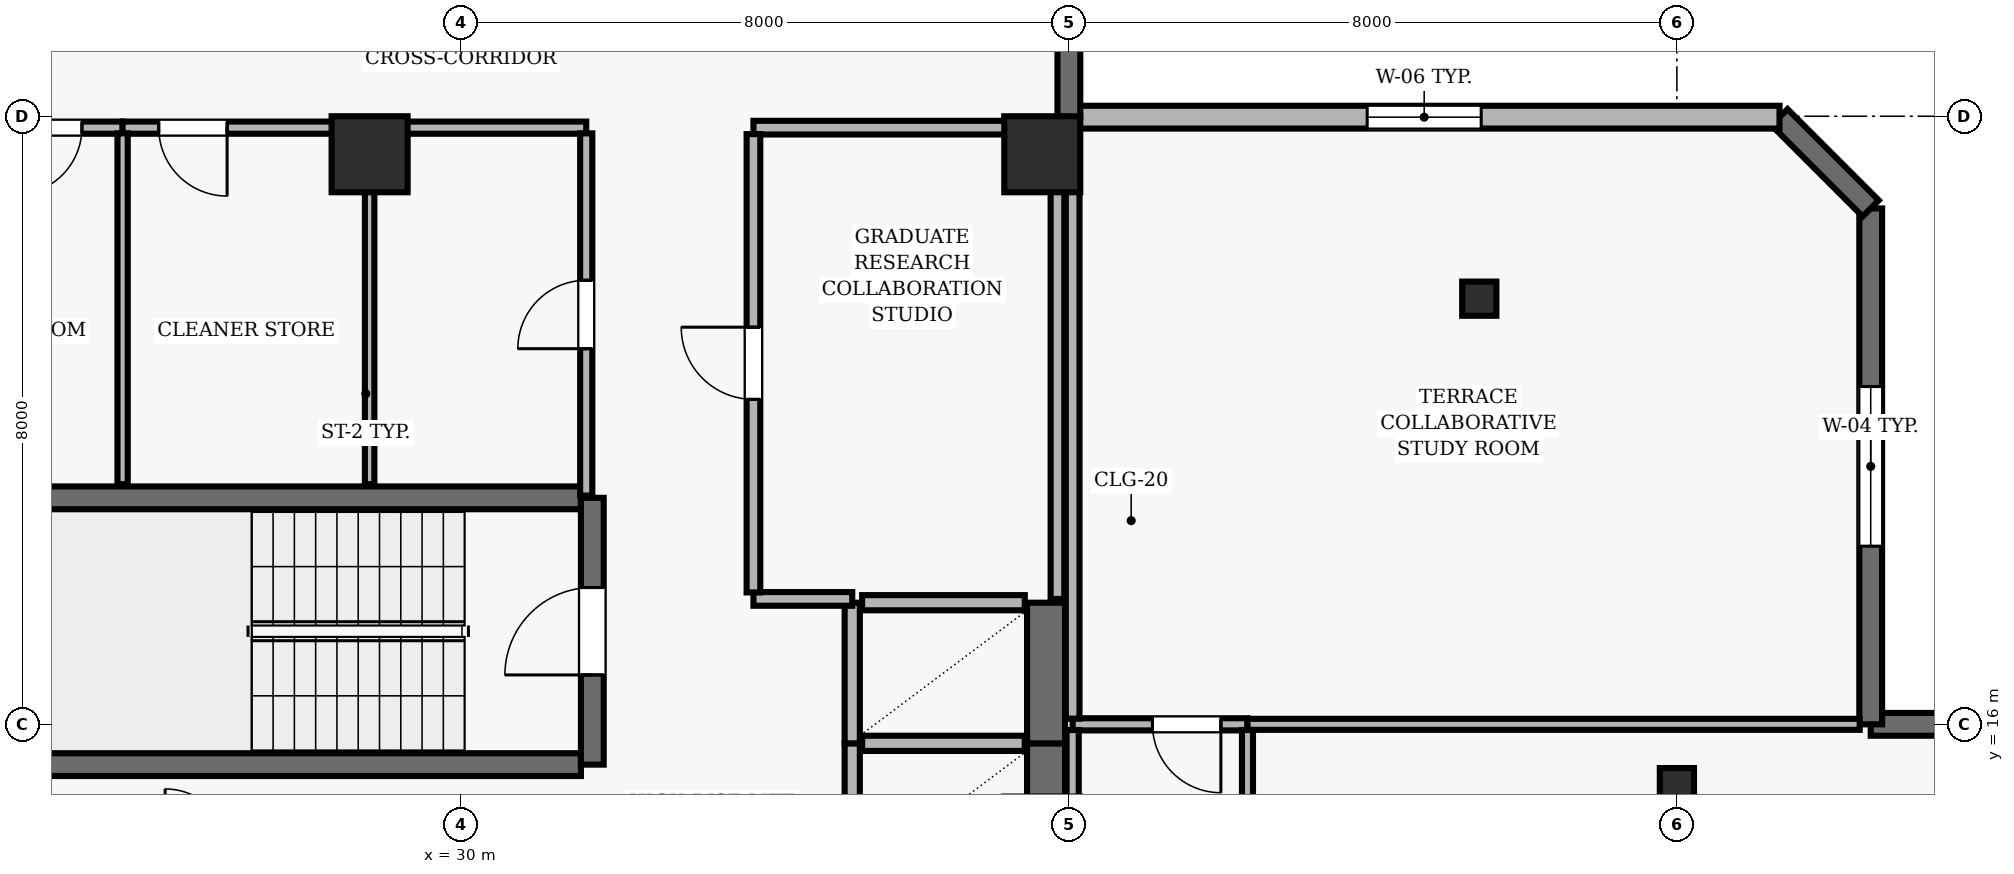
"""IFC4 building model, lengths in metres.
Left out: names, types, materials, properties, quantities, classifications, styles, units other than length and angle.
Written with IfcOpenShell. Run it as: python <this file> out.ifc"""

import sys

from ifc_helpers import new_model, si_unit, direction, frame, frame_2d, origin, origin_2d, place, context, subcontext, project, spatial, rectangle, hollow_rectangle, extrude, element, fill, save


model = new_model("IFC4")
c1 = context("Model", 3, precision=1e-05, world=origin(), true_north=direction((0.0, 1.0)))
c2 = subcontext(c1, "Body", "Model", "MODEL_VIEW")
j1 = project(units=[si_unit("LENGTHUNIT", "METRE"), si_unit("PLANEANGLEUNIT", "RADIAN")], contexts=[c1])
p1 = place(None, origin())
s1 = spatial("IfcSite", under=j1, at=p1, CompositionType="ELEMENT")
p2 = place(p1, origin())
s2 = spatial("IfcBuilding", under=s1, at=p2, CompositionType="ELEMENT")
p3 = place(p2, frame((0.0, 0.0, 191.4)))
s3 = spatial("IfcBuildingStorey", under=s2, at=p3, CompositionType="ELEMENT", Elevation=191.4)
for number, where, z_axis, x_axis in (
    (1, (28.8, 23.5, 0.0), (0.0, 0.0, 1.0), (1.0, 0.0, 0.0)),
    (2, (37.65, 23.5, 0.0), (0.0, 0.0, 1.0), (1.0, 0.0, 0.0)),
):
    element("IfcColumn", number, at=place(p3, frame(where, z_axis=z_axis, x_axis=x_axis)), inside=s3, PredefinedType="COLUMN", context=c2, shape_type="SweptSolid", body=[
        extrude(rectangle(XDim=1.0, YDim=1.0, at=origin_2d()), origin(), (0.0, 0.0, 1.0), 3.9),
    ])
for number, where, z_axis, x_axis in (
    (3, (46.0, 15.2, 0.0), (0.0, 0.0, 1.0), (1.0, 0.0, 0.0)),
    (4, (43.4, 21.6, 0.0), (0.0, 0.0, 1.0), (1.0, 0.0, 0.0)),
):
    element("IfcColumn", number, at=place(p3, frame(where, z_axis=z_axis, x_axis=x_axis)), inside=s3, PredefinedType="COLUMN", context=c2, shape_type="SweptSolid", body=[
        extrude(hollow_rectangle(XDim=0.45, YDim=0.45, WallThickness=0.02, at=origin_2d()), origin(), (0.0, 0.0, 1.0), 3.9),
    ])
p4 = place(p3, frame((62.7, 16.0, 0.0), z_axis=(0.0, 0.0, 1.0), x_axis=(-1.0, 0.0, 0.0)))
e5 = element("IfcWall", 5, at=p4, inside=s3, PredefinedType="SOLIDWALL", context=c2, shape_type="SweptSolid", body=[
    extrude(rectangle(XDim=14.15, YDim=0.3, at=frame_2d((7.075, 0.0))), origin(), (0.0, 0.0, 1.0), 3.69),
])
p5 = place(p4, frame((6.475, 0.0, 0.0)))
e6 = element("IfcOpeningElement", 6, at=p5, cuts=e5, PredefinedType="OPENING", context=c2, shape_type="SweptSolid", body=[
    extrude(rectangle(XDim=1.0, YDim=2.2, at=frame_2d((0.5, 1.1))), frame((0.0, 0.16, 0.0), z_axis=(0.0, -1.0, 0.0), x_axis=(1.0, 0.0, 0.0)), (0.0, 0.0, 1.0), 0.32),
])
p6 = place(p4, frame((2.638, 0.0, 0.9)))
e7 = element("IfcOpeningElement", 7, at=p6, cuts=e5, PredefinedType="OPENING", context=c2, shape_type="SweptSolid", body=[
    extrude(rectangle(XDim=1.8, YDim=1.6, at=frame_2d((0.9, 0.8))), frame((0.0, 0.16, 0.0), z_axis=(0.0, -1.0, 0.0), x_axis=(1.0, 0.0, 0.0)), (0.0, 0.0, 1.0), 0.32),
])
p7 = place(p3, frame((48.55, 16.0, 0.0), z_axis=(0.0, 0.0, 1.0), x_axis=(0.0, 1.0, 0.0)))
e8 = element("IfcWall", 8, at=p7, inside=s3, PredefinedType="SOLIDWALL", context=c2, shape_type="SweptSolid", body=[
    extrude(rectangle(XDim=6.788, YDim=0.3, at=frame_2d((3.394, 0.0))), origin(), (0.0, 0.0, 1.0), 3.69),
])
p8 = place(p7, frame((2.344, 0.0, 0.9)))
e9 = element("IfcOpeningElement", 9, at=p8, cuts=e8, PredefinedType="OPENING", context=c2, shape_type="SweptSolid", body=[
    extrude(rectangle(XDim=2.1, YDim=1.6, at=frame_2d((1.05, 0.8))), frame((0.0, 0.16, 0.0), z_axis=(0.0, -1.0, 0.0), x_axis=(1.0, 0.0, 0.0)), (0.0, 0.0, 1.0), 0.32),
])
p9 = place(p3, frame((48.55, 22.788, 0.0), z_axis=(0.0, 0.0, 1.0), x_axis=(-0.707106781187, 0.707106781187, 0.0)))
e10 = element("IfcWall", 10, at=p9, inside=s3, PredefinedType="SOLIDWALL", context=c2, shape_type="SweptSolid", body=[
    extrude(rectangle(XDim=1.697, YDim=0.3, at=frame_2d((0.849, 0.0))), origin(), (0.0, 0.0, 1.0), 3.69),
])
p10 = place(p3, frame((47.35, 23.988, 0.0), z_axis=(0.0, 0.0, 1.0), x_axis=(-1.0, 0.0, 0.0)))
e11 = element("IfcWall", 11, at=p10, inside=s3, PredefinedType="SOLIDWALL", context=c2, shape_type="SweptSolid", body=[
    extrude(rectangle(XDim=9.35, YDim=0.3, at=frame_2d((4.675, 0.0))), origin(), (0.0, 0.0, 1.0), 3.69),
])
p11 = place(p10, frame((3.925, 0.0, 0.9)))
e12 = element("IfcOpeningElement", 12, at=p11, cuts=e11, PredefinedType="OPENING", context=c2, shape_type="SweptSolid", body=[
    extrude(rectangle(XDim=1.5, YDim=1.8, at=frame_2d((0.75, 0.9))), frame((0.0, 0.16, 0.0), z_axis=(0.0, -1.0, 0.0), x_axis=(1.0, 0.0, 0.0)), (0.0, 0.0, 1.0), 0.32),
])
p12 = place(p3, frame((38.0, 23.988, 0.0), z_axis=(0.0, 0.0, 1.0), x_axis=(0.0, 1.0, 0.0)))
e13 = element("IfcWall", 13, at=p12, inside=s3, PredefinedType="SOLIDWALL", context=c2, shape_type="SweptSolid", body=[
    extrude(rectangle(XDim=16.712, YDim=0.3, at=frame_2d((8.356, 0.0))), origin(), (0.0, 0.0, 1.0), 3.69),
])
p13 = place(p12, frame((7.956, 0.0, 0.0)))
e14 = element("IfcOpeningElement", 14, at=p13, cuts=e13, PredefinedType="OPENING", context=c2, shape_type="SweptSolid", body=[
    extrude(rectangle(XDim=1.0, YDim=2.2, at=frame_2d((0.5, 1.1))), frame((0.0, 0.16, 0.0), z_axis=(0.0, -1.0, 0.0), x_axis=(1.0, 0.0, 0.0)), (0.0, 0.0, 1.0), 0.32),
])
p14 = place(p12, frame((2.785, 0.0, 0.9)))
e15 = element("IfcOpeningElement", 15, at=p14, cuts=e13, PredefinedType="OPENING", context=c2, shape_type="SweptSolid", body=[
    extrude(rectangle(XDim=1.8, YDim=1.8, at=frame_2d((0.9, 0.9))), frame((0.0, 0.16, 0.0), z_axis=(0.0, -1.0, 0.0), x_axis=(1.0, 0.0, 0.0)), (0.0, 0.0, 1.0), 0.32),
])
for number, where, z_axis, x_axis in (
    (16, (31.58, 18.98, 0.0), (0.0, 0.0, 1.0), (-1.0, 0.0, 0.0)),
    (17, (23.22, 15.47, 0.0), (0.0, 0.0, 1.0), (1.0, 0.0, 0.0)),
):
    element("IfcWall", number, at=place(p3, frame(where, z_axis=z_axis, x_axis=x_axis)), inside=s3, PredefinedType="SHEAR", context=c2, shape_type="SweptSolid", body=[
        extrude(rectangle(XDim=8.36, YDim=0.3, at=frame_2d((4.18, 0.0))), origin(), (0.0, 0.0, 1.0), 3.69),
    ])
p15 = place(p3, frame((31.73, 15.47, 0.0), z_axis=(0.0, 0.0, 1.0), x_axis=(0.0, 1.0, 0.0)))
e18 = element("IfcWall", 18, at=p15, inside=s3, PredefinedType="SHEAR", context=c2, shape_type="SweptSolid", body=[
    extrude(rectangle(XDim=3.51, YDim=0.3, at=frame_2d((1.755, 0.0))), origin(), (0.0, 0.0, 1.0), 3.69),
])
p16 = place(p15, frame((1.18, 0.0, 0.0)))
e19 = element("IfcOpeningElement", 19, at=p16, cuts=e18, PredefinedType="OPENING", context=c2, shape_type="SweptSolid", body=[
    extrude(rectangle(XDim=1.15, YDim=2.15, at=frame_2d((0.575, 1.075))), frame((0.0, 0.16, 0.0), z_axis=(0.0, -1.0, 0.0), x_axis=(1.0, 0.0, 0.0)), (0.0, 0.0, 1.0), 0.32),
])
p17 = place(p3, frame((35.15, 15.75, 0.0), z_axis=(0.0, 0.0, 1.0), x_axis=(0.0, -1.0, 0.0)))
e20 = element("IfcWall", 20, at=p17, inside=s3, PredefinedType="SOLIDWALL", context=c2, shape_type="SweptSolid", body=[
    extrude(rectangle(XDim=1.85, YDim=0.2, at=frame_2d((0.925, 0.0))), origin(), (0.0, 0.0, 1.0), 3.69),
])
p18 = place(p3, frame((37.7, 13.9, 0.0), z_axis=(0.0, 0.0, 1.0), x_axis=(0.0, 1.0, 0.0)))
e21 = element("IfcWall", 21, at=p18, inside=s3, PredefinedType="SHEAR", context=c2, shape_type="SweptSolid", body=[
    extrude(rectangle(XDim=1.85, YDim=0.5, at=frame_2d((0.925, 0.0))), origin(), (0.0, 0.0, 1.0), 3.69),
])
p19 = place(p3, frame((37.42, 15.75, 0.0), z_axis=(0.0, 0.0, 1.0), x_axis=(-1.0, 0.0, 0.0)))
e22 = element("IfcWall", 22, at=p19, inside=s3, PredefinedType="SOLIDWALL", context=c2, shape_type="SweptSolid", body=[
    extrude(rectangle(XDim=2.14, YDim=0.2, at=frame_2d((1.07, 0.0))), origin(), (0.0, 0.0, 1.0), 3.69),
])
p20 = place(p3, frame((35.15, 17.6, 0.0), z_axis=(0.0, 0.0, 1.0), x_axis=(0.0, -1.0, 0.0)))
e23 = element("IfcWall", 23, at=p20, inside=s3, PredefinedType="SOLIDWALL", context=c2, shape_type="SweptSolid", body=[
    extrude(rectangle(XDim=1.85, YDim=0.2, at=frame_2d((0.925, 0.0))), origin(), (0.0, 0.0, 1.0), 3.69),
])
p21 = place(p3, frame((37.7, 15.75, 0.0), z_axis=(0.0, 0.0, 1.0), x_axis=(0.0, 1.0, 0.0)))
e24 = element("IfcWall", 24, at=p21, inside=s3, PredefinedType="SHEAR", context=c2, shape_type="SweptSolid", body=[
    extrude(rectangle(XDim=1.85, YDim=0.5, at=frame_2d((0.925, 0.0))), origin(), (0.0, 0.0, 1.0), 3.69),
])
p22 = place(p3, frame((37.42, 17.6, 0.0), z_axis=(0.0, 0.0, 1.0), x_axis=(-1.0, 0.0, 0.0)))
e25 = element("IfcWall", 25, at=p22, inside=s3, PredefinedType="SOLIDWALL", context=c2, shape_type="SweptSolid", body=[
    extrude(rectangle(XDim=2.14, YDim=0.2, at=frame_2d((1.07, 0.0))), origin(), (0.0, 0.0, 1.0), 3.69),
])
p23 = place(p3, frame((25.55, 23.85, 0.0), z_axis=(0.0, 0.0, 1.0), x_axis=(-1.0, 0.0, 0.0)))
e26 = element("IfcWall", 26, at=p23, inside=s3, PredefinedType="PARTITIONING", context=c2, shape_type="SweptSolid", body=[
    extrude(rectangle(XDim=3.35, YDim=0.16, at=frame_2d((1.675, 0.0))), origin(), (0.0, 0.0, 1.0), 3.139),
])
p24 = place(p23, frame((0.535, 0.0, 0.0)))
e27 = element("IfcOpeningElement", 27, at=p24, cuts=e26, PredefinedType="OPENING", context=c2, shape_type="SweptSolid", body=[
    extrude(rectangle(XDim=0.88, YDim=2.1, at=frame_2d((0.44, 1.05))), frame((0.0, 0.09, 0.0), z_axis=(0.0, -1.0, 0.0), x_axis=(1.0, 0.0, 0.0)), (0.0, 0.0, 1.0), 0.18),
])
p25 = place(p3, frame((28.8, 23.85, 0.0), z_axis=(0.0, 0.0, 1.0), x_axis=(-1.0, 0.0, 0.0)))
e28 = element("IfcWall", 28, at=p25, inside=s3, PredefinedType="PARTITIONING", context=c2, shape_type="SweptSolid", body=[
    extrude(rectangle(XDim=3.25, YDim=0.16, at=frame_2d((1.625, 0.0))), origin(), (0.0, 0.0, 1.0), 3.139),
])
p26 = place(p25, frame((1.875, 0.0, 0.0)))
e29 = element("IfcOpeningElement", 29, at=p26, cuts=e28, PredefinedType="OPENING", context=c2, shape_type="SweptSolid", body=[
    extrude(rectangle(XDim=0.9, YDim=2.1, at=frame_2d((0.45, 1.05))), frame((0.0, 0.09, 0.0), z_axis=(0.0, -1.0, 0.0), x_axis=(1.0, 0.0, 0.0)), (0.0, 0.0, 1.0), 0.18),
])
p27 = place(p3, frame((31.65, 23.85, 0.0), z_axis=(0.0, 0.0, 1.0), x_axis=(-1.0, 0.0, 0.0)))
e30 = element("IfcWall", 30, at=p27, inside=s3, PredefinedType="PARTITIONING", context=c2, shape_type="SweptSolid", body=[
    extrude(rectangle(XDim=2.85, YDim=0.16, at=frame_2d((1.425, 0.0))), origin(), (0.0, 0.0, 1.0), 3.139),
])
p28 = place(p3, frame((33.85, 17.65, 0.0), z_axis=(0.0, 0.0, 1.0), x_axis=(1.0, 0.0, 0.0)))
e31 = element("IfcWall", 31, at=p28, inside=s3, PredefinedType="PARTITIONING", context=c2, shape_type="SweptSolid", body=[
    extrude(rectangle(XDim=1.3, YDim=0.18, at=frame_2d((0.65, 0.0))), origin(), (0.0, 0.0, 1.0), 3.69),
])
p29 = place(p3, frame((37.85, 23.85, 0.0), z_axis=(0.0, 0.0, 1.0), x_axis=(-1.0, 0.0, 0.0)))
e32 = element("IfcWall", 32, at=p29, inside=s3, PredefinedType="PARTITIONING", context=c2, shape_type="SweptSolid", body=[
    extrude(rectangle(XDim=4.0, YDim=0.18, at=frame_2d((2.0, 0.0))), origin(), (0.0, 0.0, 1.0), 3.139),
])
p30 = place(p3, frame((40.35, 16.0, 0.0), z_axis=(0.0, 0.0, 1.0), x_axis=(-1.0, 0.0, 0.0)))
e33 = element("IfcWall", 33, at=p30, inside=s3, PredefinedType="PARTITIONING", context=c2, shape_type="SweptSolid", body=[
    extrude(rectangle(XDim=2.3, YDim=0.16, at=frame_2d((1.15, 0.0))), origin(), (0.0, 0.0, 1.0), 3.69),
])
p31 = place(p30, frame((0.35, 0.0, 0.0)))
e34 = element("IfcOpeningElement", 34, at=p31, cuts=e33, PredefinedType="OPENING", context=c2, shape_type="SweptSolid", body=[
    extrude(rectangle(XDim=0.9, YDim=2.1, at=frame_2d((0.45, 1.05))), frame((0.0, 0.09, 0.0), z_axis=(0.0, -1.0, 0.0), x_axis=(1.0, 0.0, 0.0)), (0.0, 0.0, 1.0), 0.18),
])
p32 = place(p3, frame((40.35, 16.0, 0.0), z_axis=(0.0, 0.0, 1.0), x_axis=(1.0, 0.0, 0.0)))
e35 = element("IfcWall", 35, at=p32, inside=s3, PredefinedType="PARTITIONING", context=c2, shape_type="SweptSolid", body=[
    extrude(rectangle(XDim=8.055, YDim=0.145, at=frame_2d((4.027, 0.0))), origin(), (0.0, 0.0, 1.0), 3.39),
])
p33 = place(p3, frame((25.55, 19.16, 0.0), z_axis=(0.0, 0.0, 1.0), x_axis=(0.0, 1.0, 0.0)))
e36 = element("IfcWall", 36, at=p33, inside=s3, PredefinedType="PARTITIONING", context=c2, shape_type="SweptSolid", body=[
    extrude(rectangle(XDim=4.615, YDim=0.135, at=frame_2d((2.308, 0.0))), origin(), (0.0, 0.0, 1.0), 3.69),
])
p34 = place(p3, frame((28.8, 23.775, 0.0), z_axis=(0.0, 0.0, 1.0), x_axis=(0.0, -1.0, 0.0)))
e37 = element("IfcWall", 37, at=p34, inside=s3, PredefinedType="PARTITIONING", context=c2, shape_type="SweptSolid", body=[
    extrude(rectangle(XDim=4.615, YDim=0.125, at=frame_2d((2.308, 0.0))), origin(), (0.0, 0.0, 1.0), 3.69),
])
p35 = place(p3, frame((31.65, 19.01, 0.0), z_axis=(0.0, 0.0, 1.0), x_axis=(0.0, 1.0, 0.0)))
e38 = element("IfcWall", 38, at=p35, inside=s3, PredefinedType="PARTITIONING", context=c2, shape_type="SweptSolid", body=[
    extrude(rectangle(XDim=4.765, YDim=0.16, at=frame_2d((2.382, 0.0))), origin(), (0.0, 0.0, 1.0), 3.69),
])
p36 = place(p35, frame((1.932, 0.0, 0.0)))
e39 = element("IfcOpeningElement", 39, at=p36, cuts=e38, PredefinedType="OPENING", context=c2, shape_type="SweptSolid", body=[
    extrude(rectangle(XDim=0.9, YDim=2.1, at=frame_2d((0.45, 1.05))), frame((0.0, 0.09, 0.0), z_axis=(0.0, -1.0, 0.0), x_axis=(1.0, 0.0, 0.0)), (0.0, 0.0, 1.0), 0.18),
])
p37 = place(p3, frame((33.85, 17.735, 0.0), z_axis=(0.0, 0.0, 1.0), x_axis=(0.0, 1.0, 0.0)))
e40 = element("IfcWall", 40, at=p37, inside=s3, PredefinedType="PARTITIONING", context=c2, shape_type="SweptSolid", body=[
    extrude(rectangle(XDim=6.03, YDim=0.18, at=frame_2d((3.015, 0.0))), origin(), (0.0, 0.0, 1.0), 3.69),
])
p38 = place(p37, frame((2.54, 0.0, 0.0)))
e41 = element("IfcOpeningElement", 41, at=p38, cuts=e40, PredefinedType="OPENING", context=c2, shape_type="SweptSolid", body=[
    extrude(rectangle(XDim=0.95, YDim=2.1, at=frame_2d((0.475, 1.05))), frame((0.0, 0.1, 0.0), z_axis=(0.0, -1.0, 0.0), x_axis=(1.0, 0.0, 0.0)), (0.0, 0.0, 1.0), 0.2),
])
p39 = place(p3, frame((37.85, 17.65, 0.0), z_axis=(0.0, 0.0, 1.0), x_axis=(0.0, 1.0, 0.0)))
e42 = element("IfcWall", 42, at=p39, inside=s3, PredefinedType="PARTITIONING", context=c2, shape_type="SweptSolid", body=[
    extrude(rectangle(XDim=6.115, YDim=0.18, at=frame_2d((3.058, 0.0))), origin(), (0.0, 0.0, 1.0), 3.139),
])
p40 = place(p3, frame((38.05, 15.925, 0.0), z_axis=(0.0, 0.0, 1.0), x_axis=(0.0, -1.0, 0.0)))
e43 = element("IfcWall", 43, at=p40, inside=s3, PredefinedType="PARTITIONING", context=c2, shape_type="SweptSolid", body=[
    extrude(rectangle(XDim=6.375, YDim=0.16, at=frame_2d((3.188, 0.0))), origin(), (0.0, 0.0, 1.0), 3.139),
])
p41 = place(p3, frame((38.05, 23.843, 0.0), z_axis=(0.0, 0.0, 1.0), x_axis=(0.0, -1.0, 0.0)))
e44 = element("IfcWall", 44, at=p41, inside=s3, PredefinedType="PARTITIONING", context=c2, shape_type="SweptSolid", body=[
    extrude(rectangle(XDim=7.768, YDim=0.18, at=frame_2d((3.884, 0.0))), origin(), (0.0, 0.0, 1.0), 3.139),
])
p42 = place(p3, frame((40.35, 7.617, 0.0), z_axis=(0.0, 0.0, 1.0), x_axis=(0.0, 1.0, 0.0)))
e45 = element("IfcWall", 45, at=p42, inside=s3, PredefinedType="PARTITIONING", context=c2, shape_type="SweptSolid", body=[
    extrude(rectangle(XDim=8.308, YDim=0.145, at=frame_2d((4.154, 0.0))), origin(), (0.0, 0.0, 1.0), 3.343),
])
p43 = place(p8, origin())
e46 = element("IfcWindow", 46, at=p43, inside=s3, PartitioningType="SINGLE_PANEL", PredefinedType="WINDOW", context=c2, shape_type="SweptSolid", body=[
    extrude(rectangle(XDim=2.1, YDim=1.6, at=frame_2d((1.05, 0.8))), frame((0.0, 0.03, 0.0), z_axis=(0.0, -1.0, 0.0), x_axis=(1.0, 0.0, 0.0)), (0.0, 0.0, 1.0), 0.06),
])
fill(e9, e46)
p44 = place(p11, origin())
e47 = element("IfcWindow", 47, at=p44, inside=s3, PartitioningType="SINGLE_PANEL", PredefinedType="WINDOW", context=c2, shape_type="SweptSolid", body=[
    extrude(rectangle(XDim=1.5, YDim=1.8, at=frame_2d((0.75, 0.9))), frame((0.0, 0.03, 0.0), z_axis=(0.0, -1.0, 0.0), x_axis=(1.0, 0.0, 0.0)), (0.0, 0.0, 1.0), 0.06),
])
fill(e12, e47)
p45 = place(p16, origin())
e48 = element("IfcDoor", 48, at=p45, inside=s3, OperationType="SINGLE_SWING_LEFT", PredefinedType="DOOR", context=c2, shape_type="SweptSolid", body=[
    extrude(rectangle(XDim=1.15, YDim=2.15, at=frame_2d((0.575, 1.075))), frame((0.0, 0.025, 0.0), z_axis=(0.0, -1.0, 0.0), x_axis=(1.0, 0.0, 0.0)), (0.0, 0.0, 1.0), 0.05),
])
fill(e19, e48)
p46 = place(p38, origin())
e49 = element("IfcDoor", 49, at=p46, inside=s3, OperationType="SINGLE_SWING_RIGHT", PredefinedType="DOOR", context=c2, shape_type="SweptSolid", body=[
    extrude(rectangle(XDim=0.95, YDim=2.1, at=frame_2d((0.475, 1.05))), frame((0.0, 0.025, 0.0), z_axis=(0.0, -1.0, 0.0), x_axis=(1.0, 0.0, 0.0)), (0.0, 0.0, 1.0), 0.05),
])
fill(e41, e49)
p47 = place(p36, origin())
e50 = element("IfcDoor", 50, at=p47, inside=s3, OperationType="SINGLE_SWING_LEFT", PredefinedType="DOOR", context=c2, shape_type="SweptSolid", body=[
    extrude(rectangle(XDim=0.9, YDim=2.1, at=frame_2d((0.45, 1.05))), frame((0.0, 0.025, 0.0), z_axis=(0.0, -1.0, 0.0), x_axis=(1.0, 0.0, 0.0)), (0.0, 0.0, 1.0), 0.05),
])
fill(e39, e50)
p48 = place(p24, origin())
e51 = element("IfcDoor", 51, at=p48, inside=s3, OperationType="SINGLE_SWING_RIGHT", PredefinedType="DOOR", context=c2, shape_type="SweptSolid", body=[
    extrude(rectangle(XDim=0.88, YDim=2.1, at=frame_2d((0.44, 1.05))), frame((0.0, 0.025, 0.0), z_axis=(0.0, -1.0, 0.0), x_axis=(1.0, 0.0, 0.0)), (0.0, 0.0, 1.0), 0.05),
])
fill(e27, e51)
p49 = place(p26, origin())
e52 = element("IfcDoor", 52, at=p49, inside=s3, OperationType="SINGLE_SWING_LEFT", PredefinedType="DOOR", context=c2, shape_type="SweptSolid", body=[
    extrude(rectangle(XDim=0.9, YDim=2.1, at=frame_2d((0.45, 1.05))), frame((0.0, 0.025, 0.0), z_axis=(0.0, -1.0, 0.0), x_axis=(1.0, 0.0, 0.0)), (0.0, 0.0, 1.0), 0.05),
])
fill(e29, e52)
p50 = place(p31, origin())
e53 = element("IfcDoor", 53, at=p50, inside=s3, OperationType="SINGLE_SWING_LEFT", PredefinedType="DOOR", context=c2, shape_type="SweptSolid", body=[
    extrude(rectangle(XDim=0.9, YDim=2.1, at=frame_2d((0.45, 1.05))), frame((0.0, 0.025, 0.0), z_axis=(0.0, -1.0, 0.0), x_axis=(1.0, 0.0, 0.0)), (0.0, 0.0, 1.0), 0.05),
])
fill(e34, e53)
save(model, sys.argv[1])
